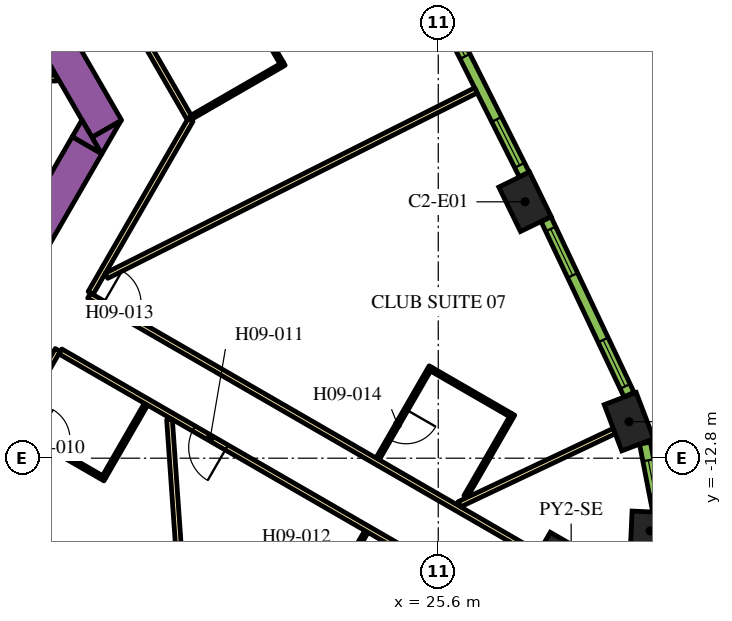
"""IFC4 building model, lengths in metres.
Left out: names, types, materials, properties, quantities, classifications, styles, units other than length and angle.
Written with IfcOpenShell. Run it as: python <this file> out.ifc"""

import sys

from ifc_helpers import new_model, si_unit, direction, frame, frame_2d, origin, origin_2d, place, context, subcontext, project, spatial, polyline, rectangle, outline, extrude, element, fill, save


model = new_model("IFC4")
c1 = context("Model", 3, precision=1e-05, world=origin(), true_north=direction((0.0, 1.0)))
c2 = subcontext(c1, "Body", "Model", "MODEL_VIEW")
j1 = project(units=[si_unit("LENGTHUNIT", "METRE"), si_unit("PLANEANGLEUNIT", "RADIAN")], contexts=[c1])
p1 = place(None, origin())
s1 = spatial("IfcSite", under=j1, at=p1, CompositionType="ELEMENT")
p2 = place(p1, origin())
s2 = spatial("IfcBuilding", under=s1, at=p2, CompositionType="ELEMENT")
p3 = place(p2, frame((0.0, 0.0, 126.6)))
s3 = spatial("IfcBuildingStorey", under=s2, at=p3, CompositionType="ELEMENT", Elevation=126.6)
p4 = place(p3, frame((29.097, -16.799, 0.0), z_axis=(0.0, 0.0, 1.0), x_axis=(0.866025403784, -0.5, 0.0)))
e1 = element("IfcColumn", 1, at=p4, inside=s3, PredefinedType="COLUMN", context=c2, shape_type="SweptSolid", body=[
    extrude(rectangle(XDim=3.0, YDim=3.0, at=origin_2d()), origin(), (0.0, 0.0, 1.0), 3.9),
])
p5 = place(p3, frame((31.177, -14.714, 0.0), z_axis=(0.0, 0.0, 1.0), x_axis=(0.046756026083, 0.998906338965, 0.0)))
e2 = element("IfcColumn", 2, at=p5, inside=s3, PredefinedType="COLUMN", context=c2, shape_type="SweptSolid", body=[
    extrude(rectangle(XDim=1.0, YDim=1.0, at=origin_2d()), origin(), (0.0, 0.0, 1.0), 3.9),
])
for number, where, z_axis, x_axis in (
    (3, (30.619, -11.839, 0.0), (0.0, 0.0, 1.0), (-0.355, 0.935, 0.0)),
    (4, (27.883, -6.054, 0.0), (0.0, 0.0, 1.0), (-0.438, 0.899, 0.0)),
):
    element("IfcColumn", number, at=place(p3, frame(where, z_axis=z_axis, x_axis=x_axis)), inside=s3, PredefinedType="COLUMN", context=c2, shape_type="SweptSolid", body=[
        extrude(rectangle(XDim=1.3, YDim=0.9, at=origin_2d()), origin(), (0.0, 0.0, 1.0), 3.9),
    ])
p6 = place(p3, frame((6.776, 13.364, 0.0), z_axis=(0.0, 0.0, 1.0), x_axis=(0.500004177138, -0.8660229921, 0.0)))
e5 = element("IfcWall", 5, at=p6, inside=s3, PredefinedType="SOLIDWALL", context=c2, shape_type="SweptSolid", body=[
    extrude(rectangle(XDim=20.204, YDim=0.9, at=frame_2d((10.102, 0.0))), origin(), (0.0, 0.0, 1.0), 3.9),
])
p7 = place(p3, origin())
e6 = element("IfcWall", 6, at=p7, inside=s3, PredefinedType="SOLIDWALL", context=c2, shape_type="SweptSolid", body=[
    extrude(outline(polyline([(16.743, -4.8), (16.489, -4.36), (17.251, -3.92), (16.743, -4.8)])), origin(), (0.0, 0.0, 1.0), 3.9),
])
p8 = place(p3, frame((11.695, -12.644, 0.0), z_axis=(0.0, 0.0, 1.0), x_axis=(0.500010229568, 0.86601949766, 0.0)))
e7 = element("IfcWall", 7, at=p8, inside=s3, PredefinedType="SOLIDWALL", context=c2, shape_type="SweptSolid", body=[
    extrude(rectangle(XDim=9.326, YDim=0.9, at=frame_2d((4.663, 0.0))), origin(), (0.0, 0.0, 1.0), 3.9),
])
e8 = element("IfcWall", 8, at=p7, inside=s3, PredefinedType="SOLIDWALL", context=c2, shape_type="SweptSolid", body=[
    extrude(outline(polyline([(16.223, -3.9), (16.732, -4.78), (15.969, -4.34), (16.223, -3.9)])), origin(), (0.0, 0.0, 1.0), 3.9),
])
p9 = place(p3, frame((12.915, -2.8, 0.0), z_axis=(0.0, 0.0, 1.0), x_axis=(1.0, 0.0, 0.0)))
e9 = element("IfcWall", 9, at=p9, inside=s3, PredefinedType="PARTITIONING", context=c2, shape_type="SweptSolid", body=[
    extrude(rectangle(XDim=2.637, YDim=0.15, at=frame_2d((1.318, 0.0))), origin(), (0.0, 0.0, 1.0), 2.75),
])
p10 = place(p3, frame((16.412, -8.523, 0.0), z_axis=(0.0, 0.0, 1.0), x_axis=(0.866025629663, -0.499999608766, 0.0)))
e10 = element("IfcWall", 10, at=p10, inside=s3, PredefinedType="PARTITIONING", context=c2, shape_type="SweptSolid", body=[
    extrude(rectangle(XDim=13.624, YDim=0.15, at=frame_2d((6.812, 0.0))), origin(), (0.0, 0.0, 1.0), 2.75),
])
p11 = place(p10, frame((0.426, 0.0, 0.0)))
e11 = element("IfcOpeningElement", 11, at=p11, cuts=e10, PredefinedType="OPENING", context=c2, shape_type="SweptSolid", body=[
    extrude(rectangle(XDim=1.0, YDim=2.1, at=frame_2d((0.5, 1.05))), frame((0.0, 0.085, 0.0), z_axis=(0.0, -1.0, 0.0), x_axis=(1.0, 0.0, 0.0)), (0.0, 0.0, 1.0), 0.17),
])
p12 = place(p3, frame((19.081, -3.9, 0.0), z_axis=(0.0, 0.0, 1.0), x_axis=(-0.499974327079, -0.866040225545, 0.0)))
e12 = element("IfcWall", 12, at=p12, inside=s3, PredefinedType="PARTITIONING", context=c2, shape_type="SweptSolid", body=[
    extrude(rectangle(XDim=5.258, YDim=0.15, at=frame_2d((2.629, 0.0))), origin(), (0.0, 0.0, 1.0), 2.75),
])
p13 = place(p3, frame((6.163, 18.475, 0.0), z_axis=(0.0, 0.0, 1.0), x_axis=(0.500001317485, -0.866024643133, 0.0)))
e13 = element("IfcWall", 13, at=p13, inside=s3, PredefinedType="PARTITIONING", context=c2, shape_type="SweptSolid", body=[
    extrude(rectangle(XDim=25.767, YDim=0.15, at=frame_2d((12.883, 0.0))), origin(), (0.0, 0.0, 1.0), 2.75),
])
p14 = place(p13, frame((19.306, 0.0, 0.0)))
e14 = element("IfcOpeningElement", 14, at=p14, cuts=e13, PredefinedType="OPENING", context=c2, shape_type="SweptSolid", body=[
    extrude(rectangle(XDim=1.0, YDim=2.1, at=frame_2d((0.5, 1.05))), frame((0.0, 0.085, 0.0), z_axis=(0.0, -1.0, 0.0), x_axis=(1.0, 0.0, 0.0)), (0.0, 0.0, 1.0), 0.17),
])
p15 = place(p13, frame((17.999, 0.0, 0.0)))
e15 = element("IfcOpeningElement", 15, at=p15, cuts=e13, PredefinedType="OPENING", context=c2, shape_type="SweptSolid", body=[
    extrude(rectangle(XDim=1.0, YDim=2.1, at=frame_2d((0.5, 1.05))), frame((0.0, 0.085, 0.0), z_axis=(0.0, -1.0, 0.0), x_axis=(1.0, 0.0, 0.0)), (0.0, 0.0, 1.0), 0.17),
])
p16 = place(p13, frame((0.596, 0.0, 0.0)))
e16 = element("IfcOpeningElement", 16, at=p16, cuts=e13, PredefinedType="OPENING", context=c2, shape_type="SweptSolid", body=[
    extrude(rectangle(XDim=1.0, YDim=2.1, at=frame_2d((0.5, 1.05))), frame((0.0, 0.085, 0.0), z_axis=(0.0, -1.0, 0.0), x_axis=(1.0, 0.0, 0.0)), (0.0, 0.0, 1.0), 0.17),
])
p17 = place(p3, frame((15.587, -9.952, 0.0), z_axis=(0.0, 0.0, 1.0), x_axis=(-0.500016618951, -0.866015808616, 0.0)))
e17 = element("IfcWall", 17, at=p17, inside=s3, PredefinedType="PARTITIONING", context=c2, shape_type="SweptSolid", body=[
    extrude(rectangle(XDim=5.268, YDim=0.15, at=frame_2d((2.634, 0.0))), origin(), (0.0, 0.0, 1.0), 2.75),
])
p18 = place(p17, frame((4.088, 0.0, 0.0)))
e18 = element("IfcOpeningElement", 18, at=p18, cuts=e17, PredefinedType="OPENING", context=c2, shape_type="SweptSolid", body=[
    extrude(rectangle(XDim=1.0, YDim=2.1, at=frame_2d((0.5, 1.05))), frame((0.0, 0.085, 0.0), z_axis=(0.0, -1.0, 0.0), x_axis=(1.0, 0.0, 0.0)), (0.0, 0.0, 1.0), 0.17),
])
p19 = place(p3, frame((27.386, -16.764, 0.0), z_axis=(0.0, 0.0, 1.0), x_axis=(-0.866022585856, 0.500004880763, 0.0)))
e19 = element("IfcWall", 19, at=p19, inside=s3, PredefinedType="PARTITIONING", context=c2, shape_type="SweptSolid", body=[
    extrude(rectangle(XDim=13.544, YDim=0.15, at=frame_2d((6.772, 0.0))), origin(), (0.0, 0.0, 1.0), 2.75),
])
p20 = place(p19, frame((8.491, 0.0, 0.0)))
e20 = element("IfcOpeningElement", 20, at=p20, cuts=e19, PredefinedType="OPENING", context=c2, shape_type="SweptSolid", body=[
    extrude(rectangle(XDim=1.0, YDim=2.1, at=frame_2d((0.5, 1.05))), frame((0.0, 0.085, 0.0), z_axis=(0.0, -1.0, 0.0), x_axis=(1.0, 0.0, 0.0)), (0.0, 0.0, 1.0), 0.17),
])
p21 = place(p3, frame((26.591, -3.122, 0.0), z_axis=(0.0, 0.0, 1.0), x_axis=(-0.893766213273, -0.448533115847, 0.0)))
e21 = element("IfcWall", 21, at=p21, inside=s3, PredefinedType="PARTITIONING", context=c2, shape_type="SweptSolid", body=[
    extrude(rectangle(XDim=10.875, YDim=0.15, at=frame_2d((5.438, 0.0))), origin(), (0.0, 0.0, 1.0), 2.75),
])
p22 = place(p3, frame((19.153, -20.671, 0.0), z_axis=(0.0, 0.0, 1.0), x_axis=(-0.070070736723, 0.997542025107, 0.0)))
e22 = element("IfcWall", 22, at=p22, inside=s3, PredefinedType="PARTITIONING", context=c2, shape_type="SweptSolid", body=[
    extrude(rectangle(XDim=8.909, YDim=0.15, at=frame_2d((4.455, 0.0))), origin(), (0.0, 0.0, 1.0), 2.75),
])
p23 = place(p3, frame((30.231, -12.085, 0.0), z_axis=(0.0, 0.0, 1.0), x_axis=(-0.904001132572, -0.427530060122, 0.0)))
e23 = element("IfcWall", 23, at=p23, inside=s3, PredefinedType="PARTITIONING", context=c2, shape_type="SweptSolid", body=[
    extrude(rectangle(XDim=4.51, YDim=0.15, at=frame_2d((2.255, 0.0))), origin(), (0.0, 0.0, 1.0), 2.75),
])
p24 = place(p3, frame((14.49, -12.003, 0.0), z_axis=(0.0, 0.0, 1.0), x_axis=(0.866059108428, -0.4999416173, 0.0)))
e24 = element("IfcWall", 24, at=p24, inside=s3, PredefinedType="PARTITIONING", context=c2, shape_type="SweptSolid", body=[
    extrude(rectangle(XDim=2.7, YDim=0.1, at=frame_2d((1.35, 0.0))), origin(), (0.0, 0.0, 1.0), 2.75),
])
p25 = place(p24, frame((0.6, 0.0, 0.0)))
e25 = element("IfcOpeningElement", 25, at=p25, cuts=e24, PredefinedType="OPENING", context=c2, shape_type="SweptSolid", body=[
    extrude(rectangle(XDim=0.9, YDim=2.1, at=frame_2d((0.45, 1.05))), frame((0.0, 0.06, 0.0), z_axis=(0.0, -1.0, 0.0), x_axis=(1.0, 0.0, 0.0)), (0.0, 0.0, 1.0), 0.12),
])
p26 = place(p3, frame((16.81, -13.285, 0.0), z_axis=(0.0, 0.0, 1.0), x_axis=(0.499994660107, 0.866028486751, 0.0)))
e26 = element("IfcWall", 26, at=p26, inside=s3, PredefinedType="PARTITIONING", context=c2, shape_type="SweptSolid", body=[
    extrude(rectangle(XDim=2.2, YDim=0.1, at=frame_2d((1.1, 0.0))), origin(), (0.0, 0.0, 1.0), 2.75),
])
p27 = place(p3, frame((23.71, -14.728, 0.0), z_axis=(0.0, 0.0, 1.0), x_axis=(-0.500006934395, -0.866021400173, 0.0)))
e27 = element("IfcWall", 27, at=p27, inside=s3, PredefinedType="PARTITIONING", context=c2, shape_type="SweptSolid", body=[
    extrude(rectangle(XDim=2.6, YDim=0.1, at=frame_2d((1.3, 0.0))), origin(), (0.0, 0.0, 1.0), 2.75),
])
p28 = place(p27, frame((0.6, 0.0, 0.0)))
e28 = element("IfcOpeningElement", 28, at=p28, cuts=e27, PredefinedType="OPENING", context=c2, shape_type="SweptSolid", body=[
    extrude(rectangle(XDim=0.9, YDim=2.1, at=frame_2d((0.45, 1.05))), frame((0.0, 0.06, 0.0), z_axis=(0.0, -1.0, 0.0), x_axis=(1.0, 0.0, 0.0)), (0.0, 0.0, 1.0), 0.12),
])
p29 = place(p3, frame((25.404, -10.395, 0.0), z_axis=(0.0, 0.0, 1.0), x_axis=(-0.49998411664, -0.866034573852, 0.0)))
e29 = element("IfcWall", 29, at=p29, inside=s3, PredefinedType="PARTITIONING", context=c2, shape_type="SweptSolid", body=[
    extrude(rectangle(XDim=2.8, YDim=0.1, at=frame_2d((1.4, 0.0))), origin(), (0.0, 0.0, 1.0), 2.75),
])
p30 = place(p29, frame((1.3, 0.0, 0.0)))
e30 = element("IfcOpeningElement", 30, at=p30, cuts=e29, PredefinedType="OPENING", context=c2, shape_type="SweptSolid", body=[
    extrude(rectangle(XDim=0.9, YDim=2.1, at=frame_2d((0.45, 1.05))), frame((0.0, 0.06, 0.0), z_axis=(0.0, -1.0, 0.0), x_axis=(1.0, 0.0, 0.0)), (0.0, 0.0, 1.0), 0.12),
])
p31 = place(p3, frame((25.422, -10.463, 0.0), z_axis=(0.0, 0.0, 1.0), x_axis=(0.866024647952, -0.500001309137, 0.0)))
e31 = element("IfcWall", 31, at=p31, inside=s3, PredefinedType="PARTITIONING", context=c2, shape_type="SweptSolid", body=[
    extrude(rectangle(XDim=2.4, YDim=0.1, at=frame_2d((1.2, 0.0))), origin(), (0.0, 0.0, 1.0), 2.75),
])
p32 = place(p3, frame((26.319, -13.81, 0.0), z_axis=(0.0, 0.0, 1.0), x_axis=(0.500004234368, 0.866022959057, 0.0)))
e32 = element("IfcWall", 32, at=p32, inside=s3, PredefinedType="PARTITIONING", context=c2, shape_type="SweptSolid", body=[
    extrude(rectangle(XDim=2.5, YDim=0.1, at=frame_2d((1.25, 0.0))), origin(), (0.0, 0.0, 1.0), 2.75),
])
p33 = place(p3, frame((20.278, -0.323, 0.0), z_axis=(0.0, 0.0, 1.0), x_axis=(0.500001309137, -0.866024647952, 0.0)))
e33 = element("IfcWall", 33, at=p33, inside=s3, PredefinedType="PARTITIONING", context=c2, shape_type="SweptSolid", body=[
    extrude(rectangle(XDim=2.4, YDim=0.1, at=frame_2d((1.2, 0.0))), origin(), (0.0, 0.0, 1.0), 2.75),
])
p34 = place(p3, frame((19.121, -3.819, 0.0), z_axis=(0.0, 0.0, 1.0), x_axis=(0.866034573852, 0.49998411664, 0.0)))
e34 = element("IfcWall", 34, at=p34, inside=s3, PredefinedType="PARTITIONING", context=c2, shape_type="SweptSolid", body=[
    extrude(rectangle(XDim=2.8, YDim=0.1, at=frame_2d((1.4, 0.0))), origin(), (0.0, 0.0, 1.0), 2.75),
])
p35 = place(p3, frame((31.385, -14.189, 0.0), z_axis=(0.0, 0.0, 1.0), x_axis=(-0.190409913989, 0.981704672829, 0.0)))
e35 = element("IfcWall", 35, at=p35, inside=s3, PredefinedType="SOLIDWALL", context=c2, shape_type="SweptSolid", body=[
    extrude(rectangle(XDim=1.819, YDim=0.29, at=frame_2d((0.91, 0.0))), origin(), (0.0, 0.0, 1.0), 3.65),
])
p36 = place(p35, frame((0.46, 0.0, 0.9)))
e36 = element("IfcOpeningElement", 36, at=p36, cuts=e35, PredefinedType="OPENING", context=c2, shape_type="SweptSolid", body=[
    extrude(rectangle(XDim=0.9, YDim=2.15, at=frame_2d((0.45, 1.075))), frame((0.0, 0.155, 0.0), z_axis=(0.0, -1.0, 0.0), x_axis=(1.0, 0.0, 0.0)), (0.0, 0.0, 1.0), 0.31),
])
p37 = place(p3, frame((30.62, -11.127, 0.0), z_axis=(0.0, 0.0, 1.0), x_axis=(-0.427543726596, 0.903994669148, 0.0)))
e37 = element("IfcWall", 37, at=p37, inside=s3, PredefinedType="SOLIDWALL", context=c2, shape_type="SweptSolid", body=[
    extrude(rectangle(XDim=5.107, YDim=0.29, at=frame_2d((2.553, 0.0))), origin(), (0.0, 0.0, 1.0), 3.65),
])
p38 = place(p37, frame((0.24, 0.0, 0.9)))
e38 = element("IfcOpeningElement", 38, at=p38, cuts=e37, PredefinedType="OPENING", context=c2, shape_type="SweptSolid", body=[
    extrude(rectangle(XDim=1.35, YDim=2.15, at=frame_2d((0.675, 1.075))), frame((0.0, 0.155, 0.0), z_axis=(0.0, -1.0, 0.0), x_axis=(1.0, 0.0, 0.0)), (0.0, 0.0, 1.0), 0.31),
])
p39 = place(p37, frame((3.471, 0.0, 0.9)))
e39 = element("IfcOpeningElement", 39, at=p39, cuts=e37, PredefinedType="OPENING", context=c2, shape_type="SweptSolid", body=[
    extrude(rectangle(XDim=1.35, YDim=2.15, at=frame_2d((0.675, 1.075))), frame((0.0, 0.155, 0.0), z_axis=(0.0, -1.0, 0.0), x_axis=(1.0, 0.0, 0.0)), (0.0, 0.0, 1.0), 0.31),
])
p40 = place(p3, frame((27.864, -5.336, 0.0), z_axis=(0.0, 0.0, 1.0), x_axis=(-0.448534297211, 0.893765620409, 0.0)))
e40 = element("IfcWall", 40, at=p40, inside=s3, PredefinedType="SOLIDWALL", context=c2, shape_type="SweptSolid", body=[
    extrude(rectangle(XDim=5.1, YDim=0.29, at=frame_2d((2.55, 0.0))), origin(), (0.0, 0.0, 1.0), 3.65),
])
p41 = place(p40, frame((0.272, 0.0, 0.9)))
e41 = element("IfcOpeningElement", 41, at=p41, cuts=e40, PredefinedType="OPENING", context=c2, shape_type="SweptSolid", body=[
    extrude(rectangle(XDim=1.35, YDim=2.15, at=frame_2d((0.675, 1.075))), frame((0.0, 0.155, 0.0), z_axis=(0.0, -1.0, 0.0), x_axis=(1.0, 0.0, 0.0)), (0.0, 0.0, 1.0), 0.31),
])
p42 = place(p40, frame((3.478, 0.0, 0.9)))
e42 = element("IfcOpeningElement", 42, at=p42, cuts=e40, PredefinedType="OPENING", context=c2, shape_type="SweptSolid", body=[
    extrude(rectangle(XDim=1.35, YDim=2.15, at=frame_2d((0.675, 1.075))), frame((0.0, 0.155, 0.0), z_axis=(0.0, -1.0, 0.0), x_axis=(1.0, 0.0, 0.0)), (0.0, 0.0, 1.0), 0.31),
])
p43 = place(p25, origin())
e43 = element("IfcDoor", 43, at=p43, inside=s3, OperationType="SINGLE_SWING_LEFT", PredefinedType="DOOR", context=c2, shape_type="SweptSolid", body=[
    extrude(rectangle(XDim=0.9, YDim=2.1, at=frame_2d((0.45, 1.05))), frame((0.0, 0.025, 0.0), z_axis=(0.0, -1.0, 0.0), x_axis=(1.0, 0.0, 0.0)), (0.0, 0.0, 1.0), 0.05),
])
fill(e25, e43)
p44 = place(p20, origin())
e44 = element("IfcDoor", 44, at=p44, inside=s3, OperationType="SINGLE_SWING_RIGHT", PredefinedType="DOOR", context=c2, shape_type="SweptSolid", body=[
    extrude(rectangle(XDim=1.0, YDim=2.1, at=frame_2d((0.5, 1.05))), frame((0.0, 0.025, 0.0), z_axis=(0.0, -1.0, 0.0), x_axis=(1.0, 0.0, 0.0)), (0.0, 0.0, 1.0), 0.05),
])
fill(e20, e44)
p45 = place(p11, origin())
e45 = element("IfcDoor", 45, at=p45, inside=s3, OperationType="SINGLE_SWING_LEFT", PredefinedType="DOOR", context=c2, shape_type="SweptSolid", body=[
    extrude(rectangle(XDim=1.0, YDim=2.1, at=frame_2d((0.5, 1.05))), frame((0.0, 0.025, 0.0), z_axis=(0.0, -1.0, 0.0), x_axis=(1.0, 0.0, 0.0)), (0.0, 0.0, 1.0), 0.05),
])
fill(e11, e45)
p46 = place(p30, origin())
e46 = element("IfcDoor", 46, at=p46, inside=s3, OperationType="SINGLE_SWING_LEFT", PredefinedType="DOOR", context=c2, shape_type="SweptSolid", body=[
    extrude(rectangle(XDim=0.9, YDim=2.1, at=frame_2d((0.45, 1.05))), frame((0.0, 0.025, 0.0), z_axis=(0.0, -1.0, 0.0), x_axis=(1.0, 0.0, 0.0)), (0.0, 0.0, 1.0), 0.05),
])
fill(e30, e46)
p47 = place(p36, origin())
e47 = element("IfcWindow", 47, at=p47, inside=s3, PartitioningType="SINGLE_PANEL", PredefinedType="WINDOW", context=c2, shape_type="SweptSolid", body=[
    extrude(rectangle(XDim=0.9, YDim=2.15, at=frame_2d((0.45, 1.075))), frame((0.0, 0.015, 0.0), z_axis=(0.0, -1.0, 0.0), x_axis=(1.0, 0.0, 0.0)), (0.0, 0.0, 1.0), 0.06),
])
fill(e36, e47)
p48 = place(p38, origin())
e48 = element("IfcWindow", 48, at=p48, inside=s3, PartitioningType="DOUBLE_PANEL_VERTICAL", PredefinedType="WINDOW", context=c2, shape_type="SweptSolid", body=[
    extrude(rectangle(XDim=1.35, YDim=2.15, at=frame_2d((0.675, 1.075))), frame((0.0, 0.015, 0.0), z_axis=(0.0, -1.0, 0.0), x_axis=(1.0, 0.0, 0.0)), (0.0, 0.0, 1.0), 0.06),
])
fill(e38, e48)
p49 = place(p39, origin())
e49 = element("IfcWindow", 49, at=p49, inside=s3, PartitioningType="DOUBLE_PANEL_VERTICAL", PredefinedType="WINDOW", context=c2, shape_type="SweptSolid", body=[
    extrude(rectangle(XDim=1.35, YDim=2.15, at=frame_2d((0.675, 1.075))), frame((0.0, 0.015, 0.0), z_axis=(0.0, -1.0, 0.0), x_axis=(1.0, 0.0, 0.0)), (0.0, 0.0, 1.0), 0.06),
])
fill(e39, e49)
p50 = place(p41, origin())
e50 = element("IfcWindow", 50, at=p50, inside=s3, PartitioningType="DOUBLE_PANEL_VERTICAL", PredefinedType="WINDOW", context=c2, shape_type="SweptSolid", body=[
    extrude(rectangle(XDim=1.35, YDim=2.15, at=frame_2d((0.675, 1.075))), frame((0.0, 0.015, 0.0), z_axis=(0.0, -1.0, 0.0), x_axis=(1.0, 0.0, 0.0)), (0.0, 0.0, 1.0), 0.06),
])
fill(e41, e50)
p51 = place(p42, origin())
e51 = element("IfcWindow", 51, at=p51, inside=s3, PartitioningType="DOUBLE_PANEL_VERTICAL", PredefinedType="WINDOW", context=c2, shape_type="SweptSolid", body=[
    extrude(rectangle(XDim=1.35, YDim=2.15, at=frame_2d((0.675, 1.075))), frame((0.0, 0.015, 0.0), z_axis=(0.0, -1.0, 0.0), x_axis=(1.0, 0.0, 0.0)), (0.0, 0.0, 1.0), 0.06),
])
fill(e42, e51)
save(model, sys.argv[1])
